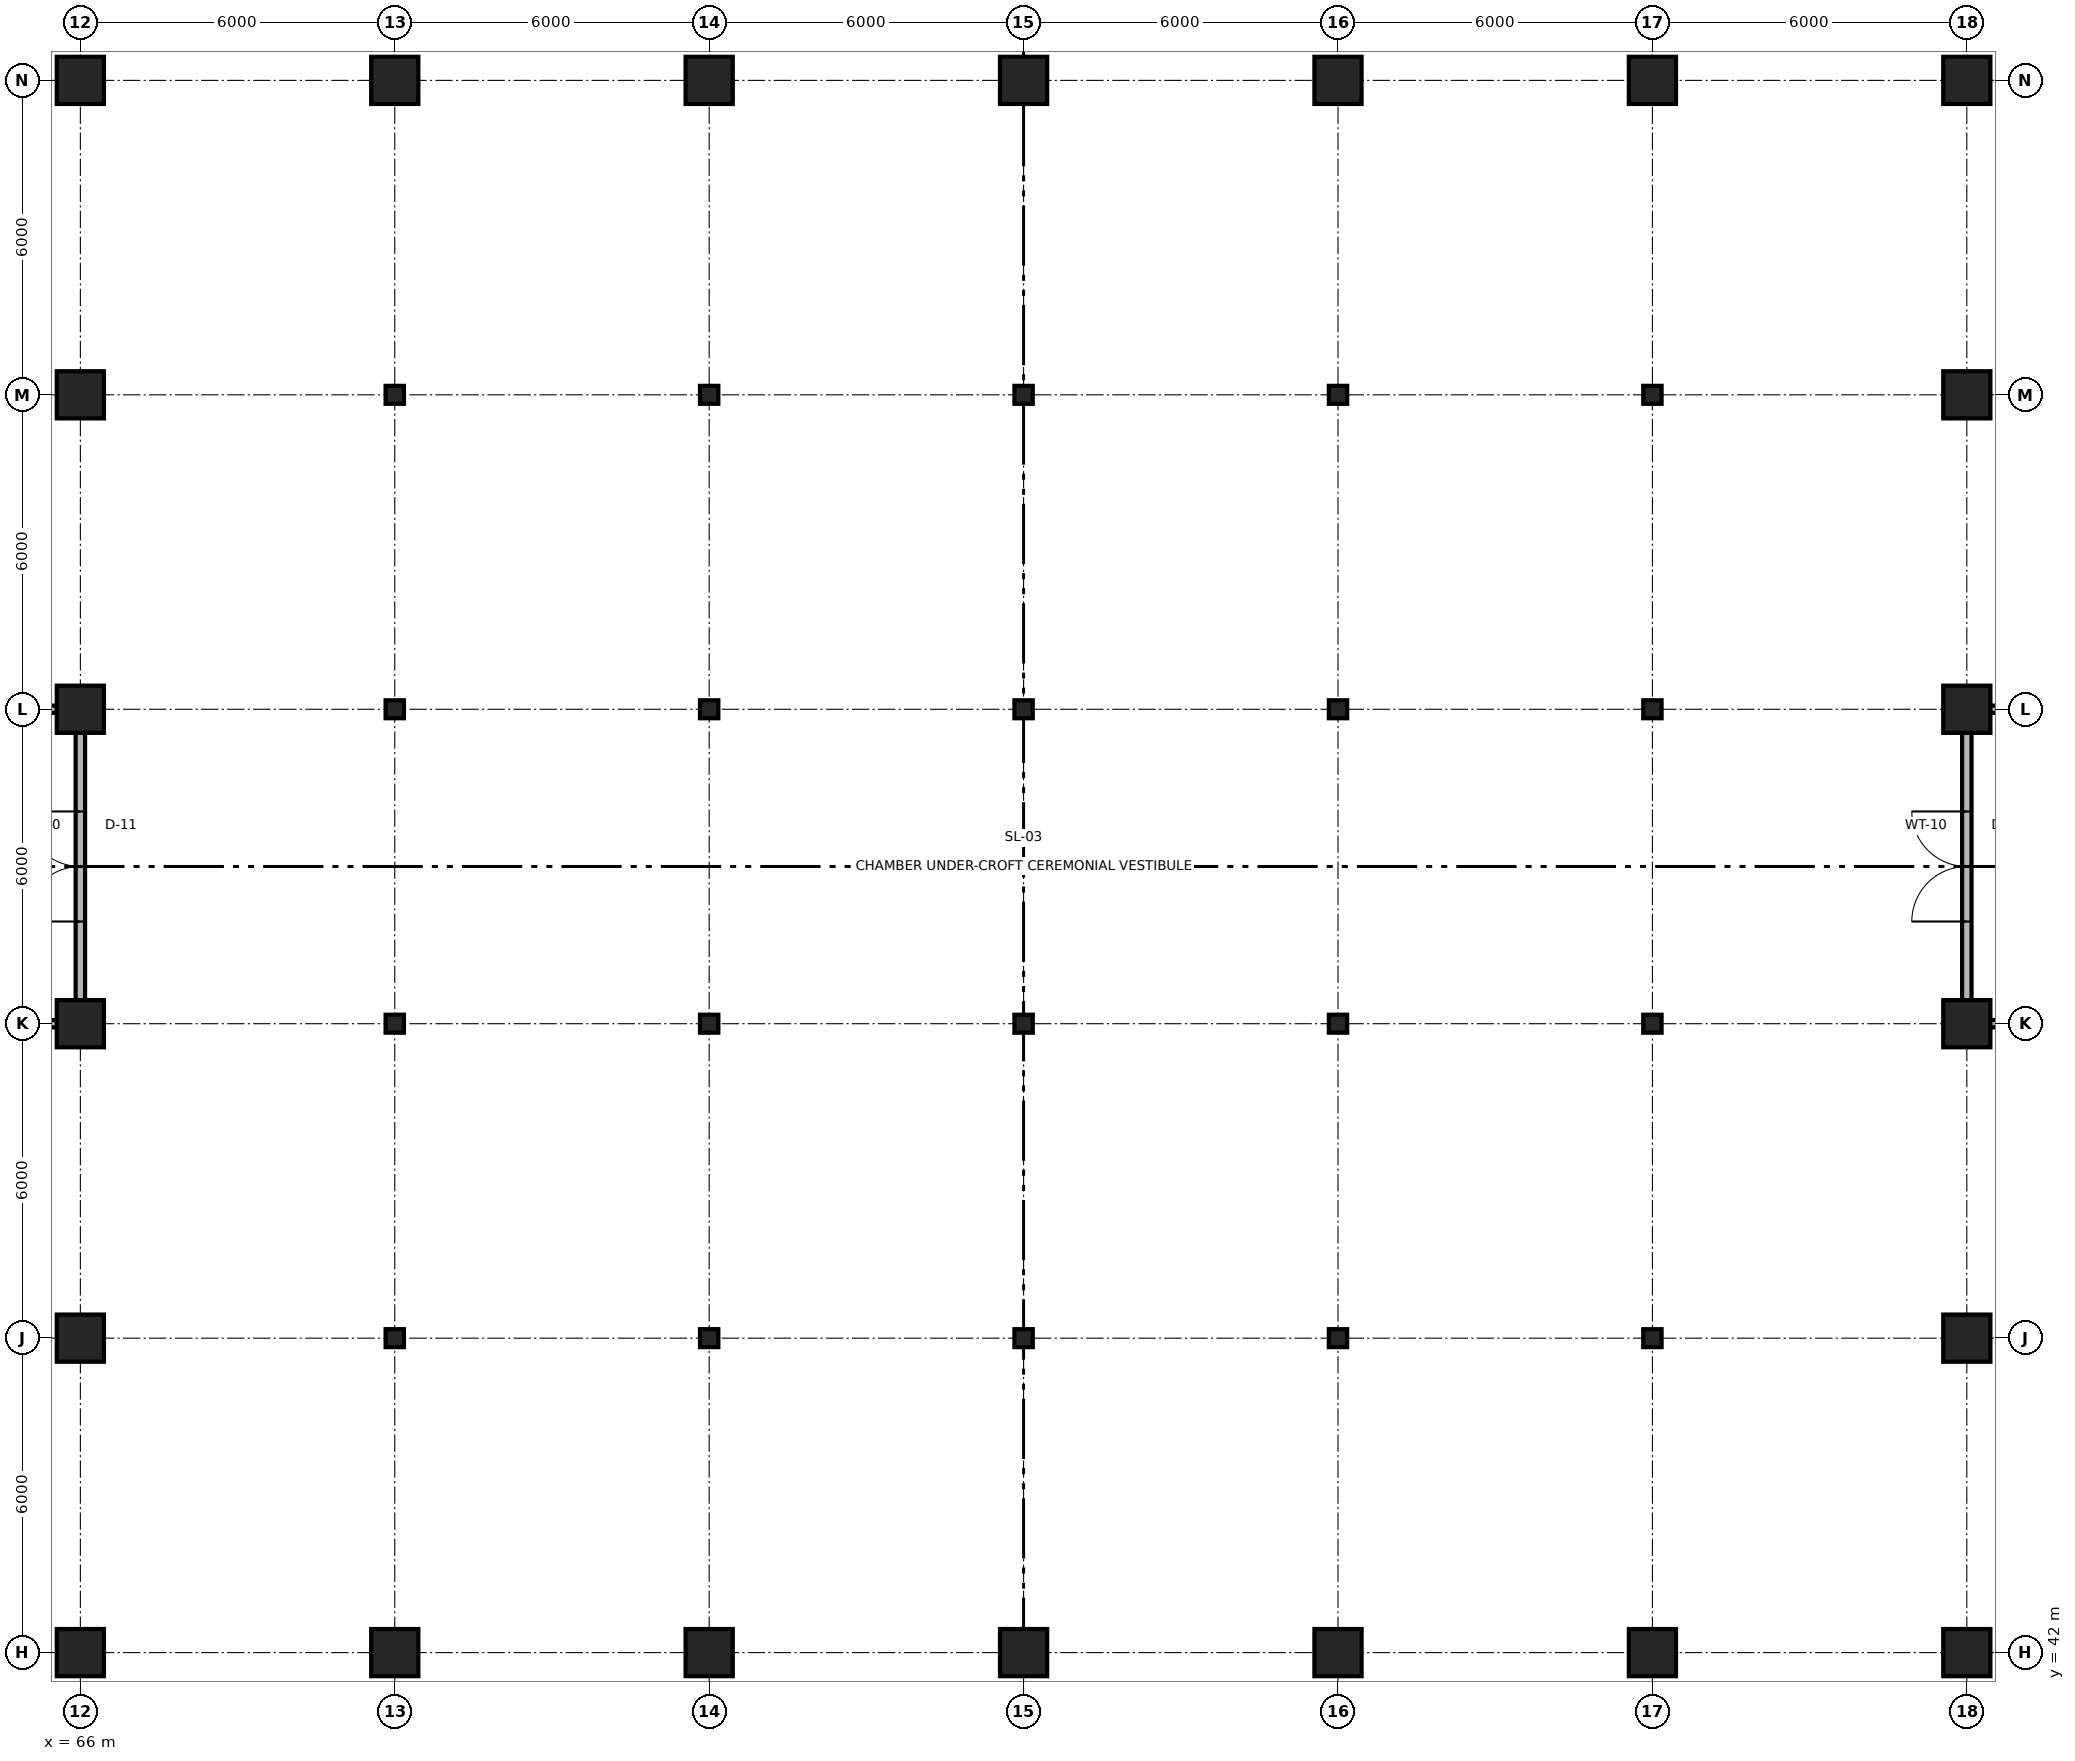
"""IFC4 building model, lengths in metres.
Left out: names, types, materials, properties, quantities, classifications, styles, units other than length and angle.
Written with IfcOpenShell. Run it as: python <this file> out.ifc"""

import sys

from ifc_helpers import new_model, si_unit, direction, frame, frame_2d, origin, origin_2d, place, context, subcontext, project, spatial, rectangle, i_section, extrude, element, fill, save


model = new_model("IFC4")
c1 = context("Model", 3, precision=1e-05, world=origin(), true_north=direction((0.0, 1.0)))
c2 = subcontext(c1, "Body", "Model", "MODEL_VIEW")
j1 = project(units=[si_unit("LENGTHUNIT", "METRE"), si_unit("PLANEANGLEUNIT", "RADIAN")], contexts=[c1])
p1 = place(None, origin())
s1 = spatial("IfcSite", under=j1, at=p1, CompositionType="ELEMENT")
p2 = place(p1, origin())
s2 = spatial("IfcBuilding", under=s1, at=p2, CompositionType="ELEMENT")
p3 = place(p2, origin())
s3 = spatial("IfcBuildingStorey", under=s2, at=p3, CompositionType="ELEMENT", Elevation=0.0)
for number, where, z_axis, x_axis in (
    (1, (66.0, 42.0, 0.0), (0.0, 0.0, 1.0), (1.0, 0.0, 0.0)),
    (2, (72.0, 42.0, 0.0), (0.0, 0.0, 1.0), (1.0, 0.0, 0.0)),
    (3, (78.0, 42.0, 0.0), (0.0, 0.0, 1.0), (1.0, 0.0, 0.0)),
    (4, (84.0, 42.0, 0.0), (0.0, 0.0, 1.0), (1.0, 0.0, 0.0)),
    (5, (90.0, 42.0, 0.0), (0.0, 0.0, 1.0), (1.0, 0.0, 0.0)),
    (6, (96.0, 42.0, 0.0), (0.0, 0.0, 1.0), (1.0, 0.0, 0.0)),
    (7, (102.0, 42.0, 0.0), (0.0, 0.0, 1.0), (1.0, 0.0, 0.0)),
    (8, (66.0, 48.0, 0.0), (0.0, 0.0, 1.0), (1.0, 0.0, 0.0)),
):
    element("IfcColumn", number, at=place(p3, frame(where, z_axis=z_axis, x_axis=x_axis)), inside=s3, PredefinedType="COLUMN", context=c2, shape_type="SweptSolid", body=[
        extrude(rectangle(XDim=0.9, YDim=0.9, at=origin_2d()), origin(), (0.0, 0.0, 1.0), 6.0),
    ])
for number, where, z_axis, x_axis in (
    (9, (72.0, 48.0, 0.0), (0.0, 0.0, 1.0), (1.0, 0.0, 0.0)),
    (10, (78.0, 48.0, 0.0), (0.0, 0.0, 1.0), (1.0, 0.0, 0.0)),
    (11, (84.0, 48.0, 0.0), (0.0, 0.0, 1.0), (1.0, 0.0, 0.0)),
    (12, (90.0, 48.0, 0.0), (0.0, 0.0, 1.0), (1.0, 0.0, 0.0)),
    (13, (96.0, 48.0, 0.0), (0.0, 0.0, 1.0), (1.0, 0.0, 0.0)),
):
    element("IfcColumn", number, at=place(p3, frame(where, z_axis=z_axis, x_axis=x_axis)), inside=s3, PredefinedType="COLUMN", context=c2, shape_type="SweptSolid", body=[
        extrude(i_section(OverallWidth=0.35, OverallDepth=0.343, WebThickness=0.01, FlangeThickness=0.015, FilletRadius=0.02, at=origin_2d()), origin(), (0.0, 0.0, 1.0), 6.0),
    ])
for number, where, z_axis, x_axis in (
    (14, (102.0, 48.0, 0.0), (0.0, 0.0, 1.0), (1.0, 0.0, 0.0)),
    (15, (66.0, 54.0, 0.0), (0.0, 0.0, 1.0), (1.0, 0.0, 0.0)),
):
    element("IfcColumn", number, at=place(p3, frame(where, z_axis=z_axis, x_axis=x_axis)), inside=s3, PredefinedType="COLUMN", context=c2, shape_type="SweptSolid", body=[
        extrude(rectangle(XDim=0.9, YDim=0.9, at=origin_2d()), origin(), (0.0, 0.0, 1.0), 6.0),
    ])
for number, where, z_axis, x_axis in (
    (16, (72.0, 54.0, 0.0), (0.0, 0.0, 1.0), (1.0, 0.0, 0.0)),
    (17, (78.0, 54.0, 0.0), (0.0, 0.0, 1.0), (1.0, 0.0, 0.0)),
    (18, (84.0, 54.0, 0.0), (0.0, 0.0, 1.0), (1.0, 0.0, 0.0)),
    (19, (90.0, 54.0, 0.0), (0.0, 0.0, 1.0), (1.0, 0.0, 0.0)),
    (20, (96.0, 54.0, 0.0), (0.0, 0.0, 1.0), (1.0, 0.0, 0.0)),
):
    element("IfcColumn", number, at=place(p3, frame(where, z_axis=z_axis, x_axis=x_axis)), inside=s3, PredefinedType="COLUMN", context=c2, shape_type="SweptSolid", body=[
        extrude(i_section(OverallWidth=0.35, OverallDepth=0.343, WebThickness=0.01, FlangeThickness=0.015, FilletRadius=0.02, at=origin_2d()), origin(), (0.0, 0.0, 1.0), 5.76),
    ])
for number, where, z_axis, x_axis in (
    (21, (102.0, 54.0, 0.0), (0.0, 0.0, 1.0), (1.0, 0.0, 0.0)),
    (22, (66.0, 60.0, 0.0), (0.0, 0.0, 1.0), (1.0, 0.0, 0.0)),
):
    element("IfcColumn", number, at=place(p3, frame(where, z_axis=z_axis, x_axis=x_axis)), inside=s3, PredefinedType="COLUMN", context=c2, shape_type="SweptSolid", body=[
        extrude(rectangle(XDim=0.9, YDim=0.9, at=origin_2d()), origin(), (0.0, 0.0, 1.0), 6.0),
    ])
for number, where, z_axis, x_axis in (
    (23, (72.0, 60.0, 0.0), (0.0, 0.0, 1.0), (1.0, 0.0, 0.0)),
    (24, (78.0, 60.0, 0.0), (0.0, 0.0, 1.0), (1.0, 0.0, 0.0)),
    (25, (84.0, 60.0, 0.0), (0.0, 0.0, 1.0), (1.0, 0.0, 0.0)),
    (26, (90.0, 60.0, 0.0), (0.0, 0.0, 1.0), (1.0, 0.0, 0.0)),
    (27, (96.0, 60.0, 0.0), (0.0, 0.0, 1.0), (1.0, 0.0, 0.0)),
):
    element("IfcColumn", number, at=place(p3, frame(where, z_axis=z_axis, x_axis=x_axis)), inside=s3, PredefinedType="COLUMN", context=c2, shape_type="SweptSolid", body=[
        extrude(i_section(OverallWidth=0.35, OverallDepth=0.343, WebThickness=0.01, FlangeThickness=0.015, FilletRadius=0.02, at=origin_2d()), origin(), (0.0, 0.0, 1.0), 5.76),
    ])
for number, where, z_axis, x_axis in (
    (28, (102.0, 60.0, 0.0), (0.0, 0.0, 1.0), (1.0, 0.0, 0.0)),
    (29, (66.0, 66.0, 0.0), (0.0, 0.0, 1.0), (1.0, 0.0, 0.0)),
):
    element("IfcColumn", number, at=place(p3, frame(where, z_axis=z_axis, x_axis=x_axis)), inside=s3, PredefinedType="COLUMN", context=c2, shape_type="SweptSolid", body=[
        extrude(rectangle(XDim=0.9, YDim=0.9, at=origin_2d()), origin(), (0.0, 0.0, 1.0), 6.0),
    ])
for number, where, z_axis, x_axis in (
    (30, (72.0, 66.0, 0.0), (0.0, 0.0, 1.0), (1.0, 0.0, 0.0)),
    (31, (78.0, 66.0, 0.0), (0.0, 0.0, 1.0), (1.0, 0.0, 0.0)),
    (32, (84.0, 66.0, 0.0), (0.0, 0.0, 1.0), (1.0, 0.0, 0.0)),
    (33, (90.0, 66.0, 0.0), (0.0, 0.0, 1.0), (1.0, 0.0, 0.0)),
    (34, (96.0, 66.0, 0.0), (0.0, 0.0, 1.0), (1.0, 0.0, 0.0)),
):
    element("IfcColumn", number, at=place(p3, frame(where, z_axis=z_axis, x_axis=x_axis)), inside=s3, PredefinedType="COLUMN", context=c2, shape_type="SweptSolid", body=[
        extrude(i_section(OverallWidth=0.35, OverallDepth=0.343, WebThickness=0.01, FlangeThickness=0.015, FilletRadius=0.02, at=origin_2d()), origin(), (0.0, 0.0, 1.0), 5.76),
    ])
for number, where, z_axis, x_axis in (
    (35, (102.0, 66.0, 0.0), (0.0, 0.0, 1.0), (1.0, 0.0, 0.0)),
    (36, (66.0, 72.0, 0.0), (0.0, 0.0, 1.0), (1.0, 0.0, 0.0)),
    (37, (72.0, 72.0, 0.0), (0.0, 0.0, 1.0), (1.0, 0.0, 0.0)),
    (38, (78.0, 72.0, 0.0), (0.0, 0.0, 1.0), (1.0, 0.0, 0.0)),
    (39, (84.0, 72.0, 0.0), (0.0, 0.0, 1.0), (1.0, 0.0, 0.0)),
    (40, (90.0, 72.0, 0.0), (0.0, 0.0, 1.0), (1.0, 0.0, 0.0)),
    (41, (96.0, 72.0, 0.0), (0.0, 0.0, 1.0), (1.0, 0.0, 0.0)),
    (42, (102.0, 72.0, 0.0), (0.0, 0.0, 1.0), (1.0, 0.0, 0.0)),
):
    element("IfcColumn", number, at=place(p3, frame(where, z_axis=z_axis, x_axis=x_axis)), inside=s3, PredefinedType="COLUMN", context=c2, shape_type="SweptSolid", body=[
        extrude(rectangle(XDim=0.9, YDim=0.9, at=origin_2d()), origin(), (0.0, 0.0, 1.0), 6.0),
    ])
p4 = place(p3, frame((66.0, 54.0, 0.0), z_axis=(0.0, 0.0, 1.0), x_axis=(0.0, 1.0, 0.0)))
e43 = element("IfcWall", 43, at=p4, inside=s3, PredefinedType="PARTITIONING", context=c2, shape_type="SweptSolid", body=[
    extrude(rectangle(XDim=6.0, YDim=0.18, at=frame_2d((3.0, 0.0))), origin(), (0.0, 0.0, 1.0), 5.32),
])
p5 = place(p4, frame((1.95, 0.0, 0.0)))
e44 = element("IfcOpeningElement", 44, at=p5, cuts=e43, PredefinedType="OPENING", context=c2, shape_type="SweptSolid", body=[
    extrude(rectangle(XDim=2.1, YDim=2.9, at=frame_2d((1.05, 1.45))), frame((0.0, 0.105, 0.0), z_axis=(0.0, -1.0, 0.0), x_axis=(1.0, 0.0, 0.0)), (0.0, 0.0, 1.0), 0.21),
])
p6 = place(p3, frame((102.0, 54.0, 0.0), z_axis=(0.0, 0.0, 1.0), x_axis=(0.0, 1.0, 0.0)))
e45 = element("IfcWall", 45, at=p6, inside=s3, PredefinedType="PARTITIONING", context=c2, shape_type="SweptSolid", body=[
    extrude(rectangle(XDim=6.0, YDim=0.18, at=frame_2d((3.0, 0.0))), origin(), (0.0, 0.0, 1.0), 5.32),
])
p7 = place(p6, frame((1.95, 0.0, 0.0)))
e46 = element("IfcOpeningElement", 46, at=p7, cuts=e45, PredefinedType="OPENING", context=c2, shape_type="SweptSolid", body=[
    extrude(rectangle(XDim=2.1, YDim=2.9, at=frame_2d((1.05, 1.45))), frame((0.0, 0.105, 0.0), z_axis=(0.0, -1.0, 0.0), x_axis=(1.0, 0.0, 0.0)), (0.0, 0.0, 1.0), 0.21),
])
for number, where, z_axis, x_axis in (
    (47, (54.0, 54.0, 0.0), (0.0, 0.0, 1.0), (1.0, 0.0, 0.0)),
    (48, (54.0, 60.0, 0.0), (0.0, 0.0, 1.0), (1.0, 0.0, 0.0)),
    (49, (102.34, 54.0, 0.0), (0.0, 0.0, 1.0), (1.0, 0.0, 0.0)),
    (50, (102.34, 60.0, 0.0), (0.0, 0.0, 1.0), (1.0, 0.0, 0.0)),
):
    element("IfcWall", number, at=place(p3, frame(where, z_axis=z_axis, x_axis=x_axis)), inside=s3, PredefinedType="PARTITIONING", context=c2, shape_type="SweptSolid", body=[
        extrude(rectangle(XDim=11.66, YDim=0.14, at=frame_2d((5.83, 0.0))), origin(), (0.0, 0.0, 1.0), 5.32),
    ])
p8 = place(p5, origin())
e51 = element("IfcDoor", 51, at=p8, inside=s3, OperationType="DOUBLE_DOOR_SINGLE_SWING", PredefinedType="DOOR", context=c2, shape_type="SweptSolid", body=[
    extrude(rectangle(XDim=2.1, YDim=2.9, at=frame_2d((1.05, 1.45))), frame((0.0, 0.025, 0.0), z_axis=(0.0, -1.0, 0.0), x_axis=(1.0, 0.0, 0.0)), (0.0, 0.0, 1.0), 0.05),
])
fill(e44, e51)
p9 = place(p7, origin())
e52 = element("IfcDoor", 52, at=p9, inside=s3, OperationType="DOUBLE_DOOR_SINGLE_SWING", PredefinedType="DOOR", context=c2, shape_type="SweptSolid", body=[
    extrude(rectangle(XDim=2.1, YDim=2.9, at=frame_2d((1.05, 1.45))), frame((0.0, 0.025, 0.0), z_axis=(0.0, -1.0, 0.0), x_axis=(1.0, 0.0, 0.0)), (0.0, 0.0, 1.0), 0.05),
])
fill(e46, e52)
save(model, sys.argv[1])
